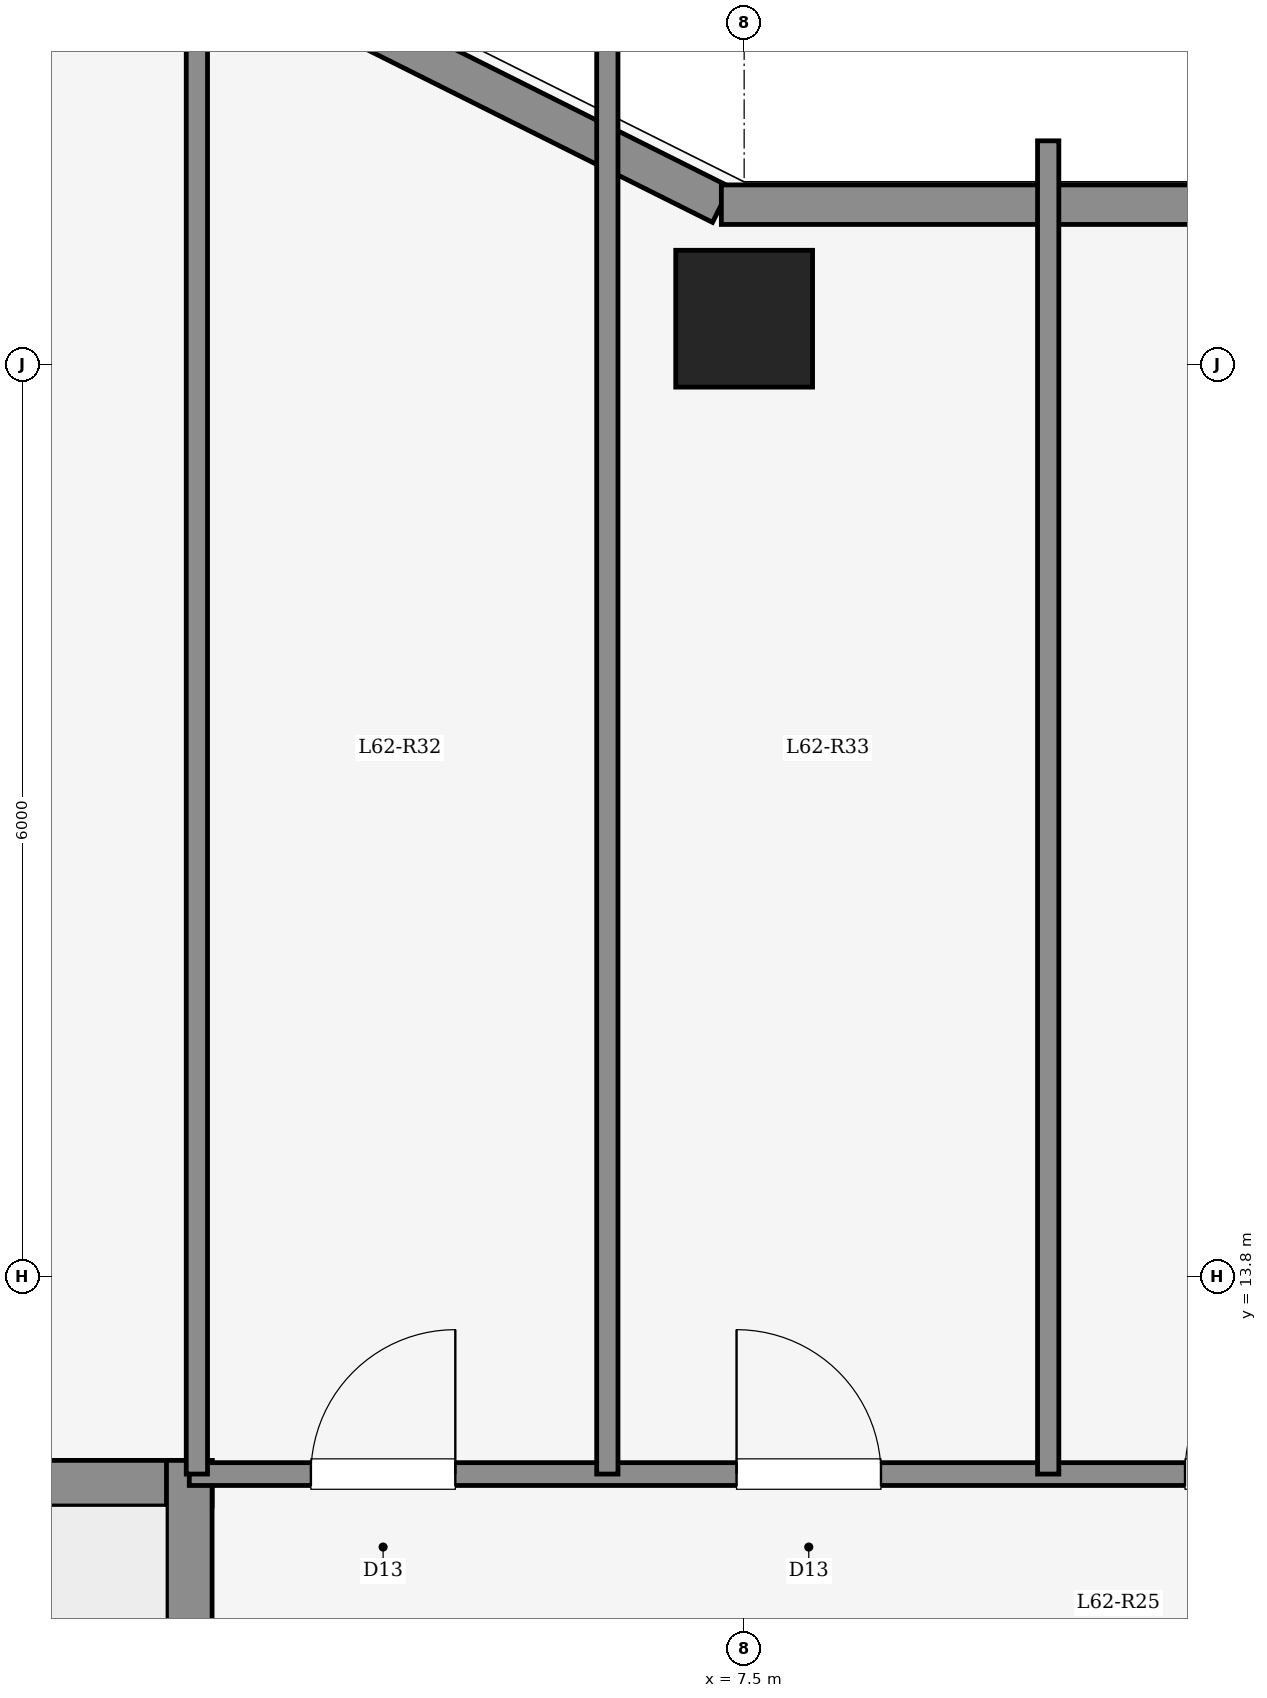
"""IFC4 building model, lengths in metres.
Left out: names, types, materials, properties, quantities, classifications, styles, units other than length and angle.
Written with IfcOpenShell. Run it as: python <this file> out.ifc"""

import sys

from ifc_helpers import new_model, si_unit, direction, frame, frame_2d, origin, origin_2d, place, context, subcontext, project, spatial, rectangle, hollow_circle, extrude, element, fill, save


model = new_model("IFC4")
c1 = context("Model", 3, precision=1e-05, world=origin(), true_north=direction((0.0, 1.0)))
c2 = subcontext(c1, "Body", "Model", "MODEL_VIEW")
j1 = project(units=[si_unit("LENGTHUNIT", "METRE"), si_unit("PLANEANGLEUNIT", "RADIAN")], contexts=[c1])
p1 = place(None, origin())
s1 = spatial("IfcSite", under=j1, at=p1, CompositionType="ELEMENT")
p2 = place(p1, origin())
s2 = spatial("IfcBuilding", under=s1, at=p2, CompositionType="ELEMENT")
p3 = place(p2, frame((0.0, 0.0, 227.1)))
s3 = spatial("IfcBuildingStorey", under=s2, at=p3, CompositionType="ELEMENT", Elevation=227.1)
p4 = place(p3, frame((7.5, 20.1, 0.0), z_axis=(0.0, 0.0, 1.0), x_axis=(1.0, 0.0, 0.0)))
e1 = element("IfcColumn", 1, at=p4, inside=s3, PredefinedType="COLUMN", context=c2, shape_type="SweptSolid", body=[
    extrude(hollow_circle(Radius=0.305, WallThickness=0.025, at=origin_2d()), origin(), (0.0, 0.0, 1.0), 4.65),
])
p5 = place(p3, frame((4.35, 22.35, 0.0), z_axis=(0.0, 0.0, 1.0), x_axis=(0.894427191, -0.4472135955, 0.0)))
e2 = element("IfcWall", 2, at=p5, inside=s3, PredefinedType="SOLIDWALL", context=c2, shape_type="SweptSolid", body=[
    extrude(rectangle(XDim=3.354, YDim=0.26, at=frame_2d((1.677, 0.0))), origin(), (0.0, 0.0, 1.0), 4.35),
])
p6 = place(p3, frame((7.35, 20.85, 0.0), z_axis=(0.0, 0.0, 1.0), x_axis=(1.0, 0.0, 0.0)))
e3 = element("IfcWall", 3, at=p6, inside=s3, PredefinedType="SOLIDWALL", context=c2, shape_type="SweptSolid", body=[
    extrude(rectangle(XDim=11.1, YDim=0.26, at=frame_2d((5.55, 0.0))), origin(), (0.0, 0.0, 1.0), 4.35),
])
p7 = place(p6, frame((3.117, 0.0, 0.95)))
e4 = element("IfcOpeningElement", 4, at=p7, cuts=e3, PredefinedType="OPENING", context=c2, shape_type="SweptSolid", body=[
    extrude(rectangle(XDim=1.2, YDim=1.5, at=frame_2d((0.6, 0.75))), frame((0.0, 0.14, 0.0), z_axis=(0.0, -1.0, 0.0), x_axis=(1.0, 0.0, 0.0)), (0.0, 0.0, 1.0), 0.28),
])
p8 = place(p6, frame((7.012, 0.0, 0.85)))
e5 = element("IfcOpeningElement", 5, at=p8, cuts=e3, PredefinedType="OPENING", context=c2, shape_type="SweptSolid", body=[
    extrude(rectangle(XDim=2.3, YDim=2.2, at=frame_2d((1.15, 1.1))), frame((0.0, 0.14, 0.0), z_axis=(0.0, -1.0, 0.0), x_axis=(1.0, 0.0, 0.0)), (0.0, 0.0, 1.0), 0.28),
])
p9 = place(p3, frame((-4.0, 12.44, 0.0), z_axis=(0.0, 0.0, 1.0), x_axis=(1.0, 0.0, 0.0)))
e6 = element("IfcWall", 6, at=p9, inside=s3, PredefinedType="SHEAR", context=c2, shape_type="SweptSolid", body=[
    extrude(rectangle(XDim=8.0, YDim=0.3, at=frame_2d((4.0, 0.0))), origin(), (0.0, 0.0, 1.0), 4.65),
])
p10 = place(p3, frame((3.85, 9.0, 0.0), z_axis=(0.0, 0.0, 1.0), x_axis=(0.0, 1.0, 0.0)))
e7 = element("IfcWall", 7, at=p10, inside=s3, PredefinedType="SHEAR", context=c2, shape_type="SweptSolid", body=[
    extrude(rectangle(XDim=3.59, YDim=0.3, at=frame_2d((1.795, 0.0))), origin(), (0.0, 0.0, 1.0), 4.65),
])
p11 = place(p3, frame((3.85, 12.5, 0.0), z_axis=(0.0, 0.0, 1.0), x_axis=(1.0, 0.0, 0.0)))
e8 = element("IfcWall", 8, at=p11, inside=s3, PredefinedType="PARTITIONING", context=c2, shape_type="SweptSolid", body=[
    extrude(rectangle(XDim=14.5, YDim=0.15, at=frame_2d((7.25, 0.0))), origin(), (0.0, 0.0, 1.0), 4.35),
])
p12 = place(p11, frame((0.8, 0.0, 0.0)))
e9 = element("IfcOpeningElement", 9, at=p12, cuts=e8, PredefinedType="OPENING", context=c2, shape_type="SweptSolid", body=[
    extrude(rectangle(XDim=0.95, YDim=2.15, at=frame_2d((0.475, 1.075))), frame((0.0, 0.085, 0.0), z_axis=(0.0, -1.0, 0.0), x_axis=(1.0, 0.0, 0.0)), (0.0, 0.0, 1.0), 0.17),
])
p13 = place(p11, frame((3.6, 0.0, 0.0)))
e10 = element("IfcOpeningElement", 10, at=p13, cuts=e8, PredefinedType="OPENING", context=c2, shape_type="SweptSolid", body=[
    extrude(rectangle(XDim=0.95, YDim=2.15, at=frame_2d((0.475, 1.075))), frame((0.0, 0.085, 0.0), z_axis=(0.0, -1.0, 0.0), x_axis=(1.0, 0.0, 0.0)), (0.0, 0.0, 1.0), 0.17),
])
p14 = place(p11, frame((6.55, 0.0, 0.0)))
e11 = element("IfcOpeningElement", 11, at=p14, cuts=e8, PredefinedType="OPENING", context=c2, shape_type="SweptSolid", body=[
    extrude(rectangle(XDim=1.08, YDim=2.15, at=frame_2d((0.54, 1.075))), frame((0.0, 0.085, 0.0), z_axis=(0.0, -1.0, 0.0), x_axis=(1.0, 0.0, 0.0)), (0.0, 0.0, 1.0), 0.17),
])
p15 = place(p11, frame((9.848, 0.0, 0.0)))
e12 = element("IfcOpeningElement", 12, at=p15, cuts=e8, PredefinedType="OPENING", context=c2, shape_type="SweptSolid", body=[
    extrude(rectangle(XDim=1.2, YDim=2.15, at=frame_2d((0.6, 1.075))), frame((0.0, 0.085, 0.0), z_axis=(0.0, -1.0, 0.0), x_axis=(1.0, 0.0, 0.0)), (0.0, 0.0, 1.0), 0.17),
])
p16 = place(p3, frame((3.9, 12.5, 0.0), z_axis=(0.0, 0.0, 1.0), x_axis=(0.0, 1.0, 0.0)))
e13 = element("IfcWall", 13, at=p16, inside=s3, PredefinedType="PARTITIONING", context=c2, shape_type="SweptSolid", body=[
    extrude(rectangle(XDim=9.88, YDim=0.14, at=frame_2d((4.94, 0.0))), origin(), (0.0, 0.0, 1.0), 4.35),
])
p17 = place(p3, frame((6.6, 12.5, 0.0), z_axis=(0.0, 0.0, 1.0), x_axis=(0.0, 1.0, 0.0)))
e14 = element("IfcWall", 14, at=p17, inside=s3, PredefinedType="PARTITIONING", context=c2, shape_type="SweptSolid", body=[
    extrude(rectangle(XDim=9.485, YDim=0.14, at=frame_2d((4.743, 0.0))), origin(), (0.0, 0.0, 1.0), 4.35),
])
p18 = place(p3, frame((9.5, 12.5, 0.0), z_axis=(0.0, 0.0, 1.0), x_axis=(0.0, 1.0, 0.0)))
e15 = element("IfcWall", 15, at=p18, inside=s3, PredefinedType="PARTITIONING", context=c2, shape_type="SweptSolid", body=[
    extrude(rectangle(XDim=8.77, YDim=0.14, at=frame_2d((4.385, 0.0))), origin(), (0.0, 0.0, 1.0), 4.35),
])
p19 = place(p12, origin())
e16 = element("IfcDoor", 16, at=p19, inside=s3, OperationType="SINGLE_SWING_RIGHT", PredefinedType="DOOR", context=c2, shape_type="SweptSolid", body=[
    extrude(rectangle(XDim=0.95, YDim=2.15, at=frame_2d((0.475, 1.075))), frame((0.0, 0.025, 0.0), z_axis=(0.0, -1.0, 0.0), x_axis=(1.0, 0.0, 0.0)), (0.0, 0.0, 1.0), 0.05),
])
fill(e9, e16)
p20 = place(p13, origin())
e17 = element("IfcDoor", 17, at=p20, inside=s3, OperationType="SINGLE_SWING_LEFT", PredefinedType="DOOR", context=c2, shape_type="SweptSolid", body=[
    extrude(rectangle(XDim=0.95, YDim=2.15, at=frame_2d((0.475, 1.075))), frame((0.0, 0.025, 0.0), z_axis=(0.0, -1.0, 0.0), x_axis=(1.0, 0.0, 0.0)), (0.0, 0.0, 1.0), 0.05),
])
fill(e10, e17)
p21 = place(p14, origin())
e18 = element("IfcDoor", 18, at=p21, inside=s3, OperationType="SINGLE_SWING_RIGHT", PredefinedType="DOOR", context=c2, shape_type="SweptSolid", body=[
    extrude(rectangle(XDim=1.08, YDim=2.15, at=frame_2d((0.54, 1.075))), frame((0.0, 0.025, 0.0), z_axis=(0.0, -1.0, 0.0), x_axis=(1.0, 0.0, 0.0)), (0.0, 0.0, 1.0), 0.05),
])
fill(e11, e18)
save(model, sys.argv[1])
